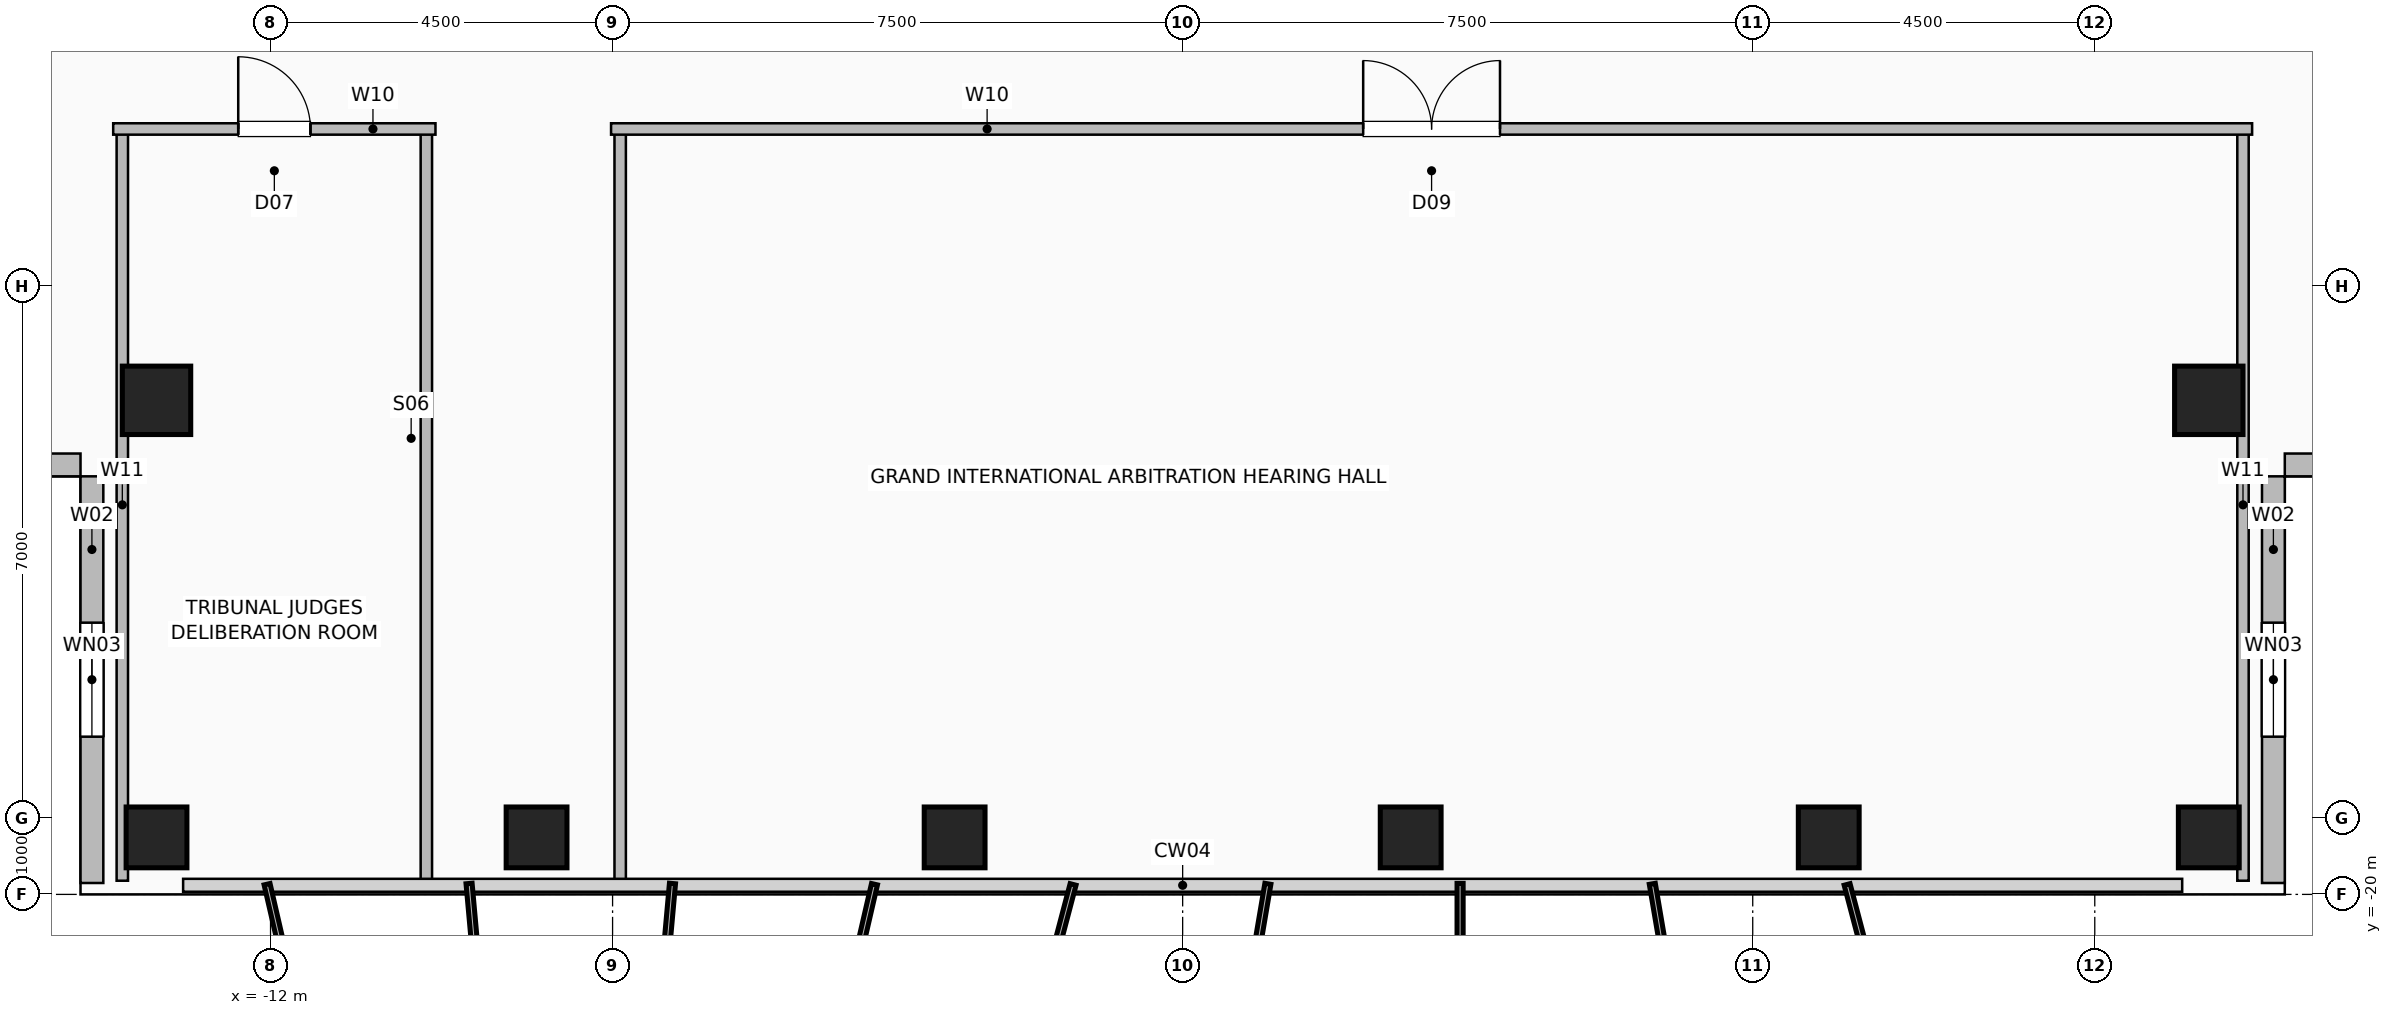
"""IFC4 building model, lengths in metres.
Left out: names, types, materials, properties, quantities, classifications, styles, units other than length and angle.
Written with IfcOpenShell. Run it as: python <this file> out.ifc"""

import sys

from ifc_helpers import new_model, si_unit, direction, frame, frame_2d, origin, origin_2d, place, context, subcontext, project, spatial, rectangle, hollow_rectangle, extrude, element, fill, save


model = new_model("IFC4")
c1 = context("Model", 3, precision=1e-05, world=origin(), true_north=direction((0.0, 1.0)))
c2 = subcontext(c1, "Body", "Model", "MODEL_VIEW")
j1 = project(units=[si_unit("LENGTHUNIT", "METRE"), si_unit("PLANEANGLEUNIT", "RADIAN")], contexts=[c1])
p1 = place(None, origin())
s1 = spatial("IfcSite", under=j1, at=p1, CompositionType="ELEMENT")
p2 = place(p1, origin())
s2 = spatial("IfcBuilding", under=s1, at=p2, CompositionType="ELEMENT")
p3 = place(p2, frame((0.0, 0.0, 184.2)))
s3 = spatial("IfcBuildingStorey", under=s2, at=p3, CompositionType="ELEMENT", Elevation=184.2)
for number, where, z_axis, x_axis in (
    (1, (-13.5, -19.25, 0.0), (0.0, 0.0, 1.0), (1.0, 0.0, 0.0)),
    (2, (-8.5, -19.25, 0.0), (0.0, 0.0, 1.0), (1.0, 0.0, 0.0)),
    (3, (-3.0, -19.25, 0.0), (0.0, 0.0, 1.0), (1.0, 0.0, 0.0)),
    (4, (3.0, -19.25, 0.0), (0.0, 0.0, 1.0), (1.0, 0.0, 0.0)),
    (5, (8.5, -19.25, 0.0), (0.0, 0.0, 1.0), (1.0, 0.0, 0.0)),
    (6, (13.5, -19.25, 0.0), (0.0, 0.0, 1.0), (1.0, 0.0, 0.0)),
):
    element("IfcColumn", number, at=place(p3, frame(where, z_axis=z_axis, x_axis=x_axis)), inside=s3, PredefinedType="COLUMN", context=c2, shape_type="SweptSolid", body=[
        extrude(hollow_rectangle(XDim=0.8, YDim=0.8, WallThickness=0.04, at=origin_2d()), origin(), (0.0, 0.0, 1.0), 3.6),
    ])
for number, where, z_axis, x_axis in (
    (7, (-13.5, -13.5, 0.0), (0.0, 0.0, 1.0), (1.0, 0.0, 0.0)),
    (8, (13.5, -13.5, 0.0), (0.0, 0.0, 1.0), (1.0, 0.0, 0.0)),
):
    element("IfcColumn", number, at=place(p3, frame(where, z_axis=z_axis, x_axis=x_axis)), inside=s3, PredefinedType="COLUMN", context=c2, shape_type="SweptSolid", body=[
        extrude(hollow_rectangle(XDim=0.9, YDim=0.9, WallThickness=0.045, at=origin_2d()), origin(), (0.0, 0.0, 1.0), 3.6),
    ])
p4 = place(p3, frame((-14.35, -19.85, 0.0), z_axis=(0.0, 0.0, 1.0), x_axis=(0.0, 1.0, 0.0)))
e9 = element("IfcWall", 9, at=p4, inside=s3, PredefinedType="SOLIDWALL", context=c2, shape_type="SweptSolid", body=[
    extrude(rectangle(XDim=5.35, YDim=0.3, at=frame_2d((2.675, 0.0))), origin(), (0.0, 0.0, 1.0), 3.36),
])
p5 = place(p4, frame((1.925, 0.0, 0.9)))
e10 = element("IfcOpeningElement", 10, at=p5, cuts=e9, PredefinedType="OPENING", context=c2, shape_type="SweptSolid", body=[
    extrude(rectangle(XDim=1.5, YDim=1.8, at=frame_2d((0.75, 0.9))), frame((0.0, 0.16, 0.0), z_axis=(0.0, -1.0, 0.0), x_axis=(1.0, 0.0, 0.0)), (0.0, 0.0, 1.0), 0.32),
])
p6 = place(p3, frame((-19.85, -14.35, 0.0), z_axis=(0.0, 0.0, 1.0), x_axis=(1.0, 0.0, 0.0)))
e11 = element("IfcWall", 11, at=p6, inside=s3, PredefinedType="SOLIDWALL", context=c2, shape_type="SweptSolid", body=[
    extrude(rectangle(XDim=5.35, YDim=0.3, at=frame_2d((2.675, 0.0))), origin(), (0.0, 0.0, 1.0), 3.36),
])
p7 = place(p3, frame((14.35, -19.85, 0.0), z_axis=(0.0, 0.0, 1.0), x_axis=(0.0, 1.0, 0.0)))
e12 = element("IfcWall", 12, at=p7, inside=s3, PredefinedType="SOLIDWALL", context=c2, shape_type="SweptSolid", body=[
    extrude(rectangle(XDim=5.35, YDim=0.3, at=frame_2d((2.675, 0.0))), origin(), (0.0, 0.0, 1.0), 3.36),
])
p8 = place(p7, frame((1.925, 0.0, 0.9)))
e13 = element("IfcOpeningElement", 13, at=p8, cuts=e12, PredefinedType="OPENING", context=c2, shape_type="SweptSolid", body=[
    extrude(rectangle(XDim=1.5, YDim=1.8, at=frame_2d((0.75, 0.9))), frame((0.0, 0.16, 0.0), z_axis=(0.0, -1.0, 0.0), x_axis=(1.0, 0.0, 0.0)), (0.0, 0.0, 1.0), 0.32),
])
p9 = place(p3, frame((19.85, -14.35, 0.0), z_axis=(0.0, 0.0, 1.0), x_axis=(-1.0, 0.0, 0.0)))
e14 = element("IfcWall", 14, at=p9, inside=s3, PredefinedType="SOLIDWALL", context=c2, shape_type="SweptSolid", body=[
    extrude(rectangle(XDim=5.35, YDim=0.3, at=frame_2d((2.675, 0.0))), origin(), (0.0, 0.0, 1.0), 3.36),
])
for number, where, z_axis, x_axis in (
    (15, (-13.95, -19.82, 0.0), (0.0, 0.0, 1.0), (0.0, 1.0, 0.0)),
    (16, (-9.95, -19.82, 0.0), (0.0, 0.0, 1.0), (0.0, 1.0, 0.0)),
):
    element("IfcWall", number, at=place(p3, frame(where, z_axis=z_axis, x_axis=x_axis)), inside=s3, PredefinedType="PARTITIONING", context=c2, shape_type="SweptSolid", body=[
        extrude(rectangle(XDim=9.89, YDim=0.15, at=frame_2d((4.945, 0.0))), origin(), (0.0, 0.0, 1.0), 3.36),
    ])
p10 = place(p3, frame((-14.07, -9.93, 0.0), z_axis=(0.0, 0.0, 1.0), x_axis=(1.0, 0.0, 0.0)))
e17 = element("IfcWall", 17, at=p10, inside=s3, PredefinedType="PARTITIONING", context=c2, shape_type="SweptSolid", body=[
    extrude(rectangle(XDim=4.24, YDim=0.15, at=frame_2d((2.12, 0.0))), origin(), (0.0, 0.0, 1.0), 3.36),
])
p11 = place(p10, frame((1.645, 0.0, 0.0)))
e18 = element("IfcOpeningElement", 18, at=p11, cuts=e17, PredefinedType="OPENING", context=c2, shape_type="SweptSolid", body=[
    extrude(rectangle(XDim=0.95, YDim=2.06, at=frame_2d((0.475, 1.03))), frame((0.0, 0.085, 0.0), z_axis=(0.0, -1.0, 0.0), x_axis=(1.0, 0.0, 0.0)), (0.0, 0.0, 1.0), 0.17),
])
for number, where, z_axis, x_axis in (
    (19, (-7.4, -19.82, 0.0), (0.0, 0.0, 1.0), (0.0, 1.0, 0.0)),
    (20, (13.95, -19.82, 0.0), (0.0, 0.0, 1.0), (0.0, 1.0, 0.0)),
):
    element("IfcWall", number, at=place(p3, frame(where, z_axis=z_axis, x_axis=x_axis)), inside=s3, PredefinedType="PARTITIONING", context=c2, shape_type="SweptSolid", body=[
        extrude(rectangle(XDim=9.89, YDim=0.15, at=frame_2d((4.945, 0.0))), origin(), (0.0, 0.0, 1.0), 3.36),
    ])
p12 = place(p3, frame((-7.52, -9.93, 0.0), z_axis=(0.0, 0.0, 1.0), x_axis=(1.0, 0.0, 0.0)))
e21 = element("IfcWall", 21, at=p12, inside=s3, PredefinedType="PARTITIONING", context=c2, shape_type="SweptSolid", body=[
    extrude(rectangle(XDim=21.59, YDim=0.15, at=frame_2d((10.795, 0.0))), origin(), (0.0, 0.0, 1.0), 3.36),
])
p13 = place(p12, frame((9.895, 0.0, 0.0)))
e22 = element("IfcOpeningElement", 22, at=p13, cuts=e21, PredefinedType="OPENING", context=c2, shape_type="SweptSolid", body=[
    extrude(rectangle(XDim=1.8, YDim=2.08, at=frame_2d((0.9, 1.04))), frame((0.0, 0.085, 0.0), z_axis=(0.0, -1.0, 0.0), x_axis=(1.0, 0.0, 0.0)), (0.0, 0.0, 1.0), 0.17),
])
p14 = place(p5, origin())
e23 = element("IfcWindow", 23, at=p14, inside=s3, PartitioningType="SINGLE_PANEL", PredefinedType="WINDOW", context=c2, shape_type="SweptSolid", body=[
    extrude(rectangle(XDim=1.5, YDim=1.8, at=frame_2d((0.75, 0.9))), frame((0.0, 0.03, 0.0), z_axis=(0.0, -1.0, 0.0), x_axis=(1.0, 0.0, 0.0)), (0.0, 0.0, 1.0), 0.06),
])
fill(e10, e23)
p15 = place(p8, origin())
e24 = element("IfcWindow", 24, at=p15, inside=s3, PartitioningType="SINGLE_PANEL", PredefinedType="WINDOW", context=c2, shape_type="SweptSolid", body=[
    extrude(rectangle(XDim=1.5, YDim=1.8, at=frame_2d((0.75, 0.9))), frame((0.0, 0.03, 0.0), z_axis=(0.0, -1.0, 0.0), x_axis=(1.0, 0.0, 0.0)), (0.0, 0.0, 1.0), 0.06),
])
fill(e13, e24)
p16 = place(p11, origin())
e25 = element("IfcDoor", 25, at=p16, inside=s3, OperationType="SINGLE_SWING_LEFT", PredefinedType="DOOR", context=c2, shape_type="SweptSolid", body=[
    extrude(rectangle(XDim=0.95, YDim=2.06, at=frame_2d((0.475, 1.03))), frame((0.0, 0.025, 0.0), z_axis=(0.0, -1.0, 0.0), x_axis=(1.0, 0.0, 0.0)), (0.0, 0.0, 1.0), 0.05),
])
fill(e18, e25)
p17 = place(p13, origin())
e26 = element("IfcDoor", 26, at=p17, inside=s3, OperationType="DOUBLE_DOOR_SINGLE_SWING", PredefinedType="DOOR", context=c2, shape_type="SweptSolid", body=[
    extrude(rectangle(XDim=1.8, YDim=2.08, at=frame_2d((0.9, 1.04))), frame((0.0, 0.025, 0.0), z_axis=(0.0, -1.0, 0.0), x_axis=(1.0, 0.0, 0.0)), (0.0, 0.0, 1.0), 0.05),
])
fill(e22, e26)
save(model, sys.argv[1])
